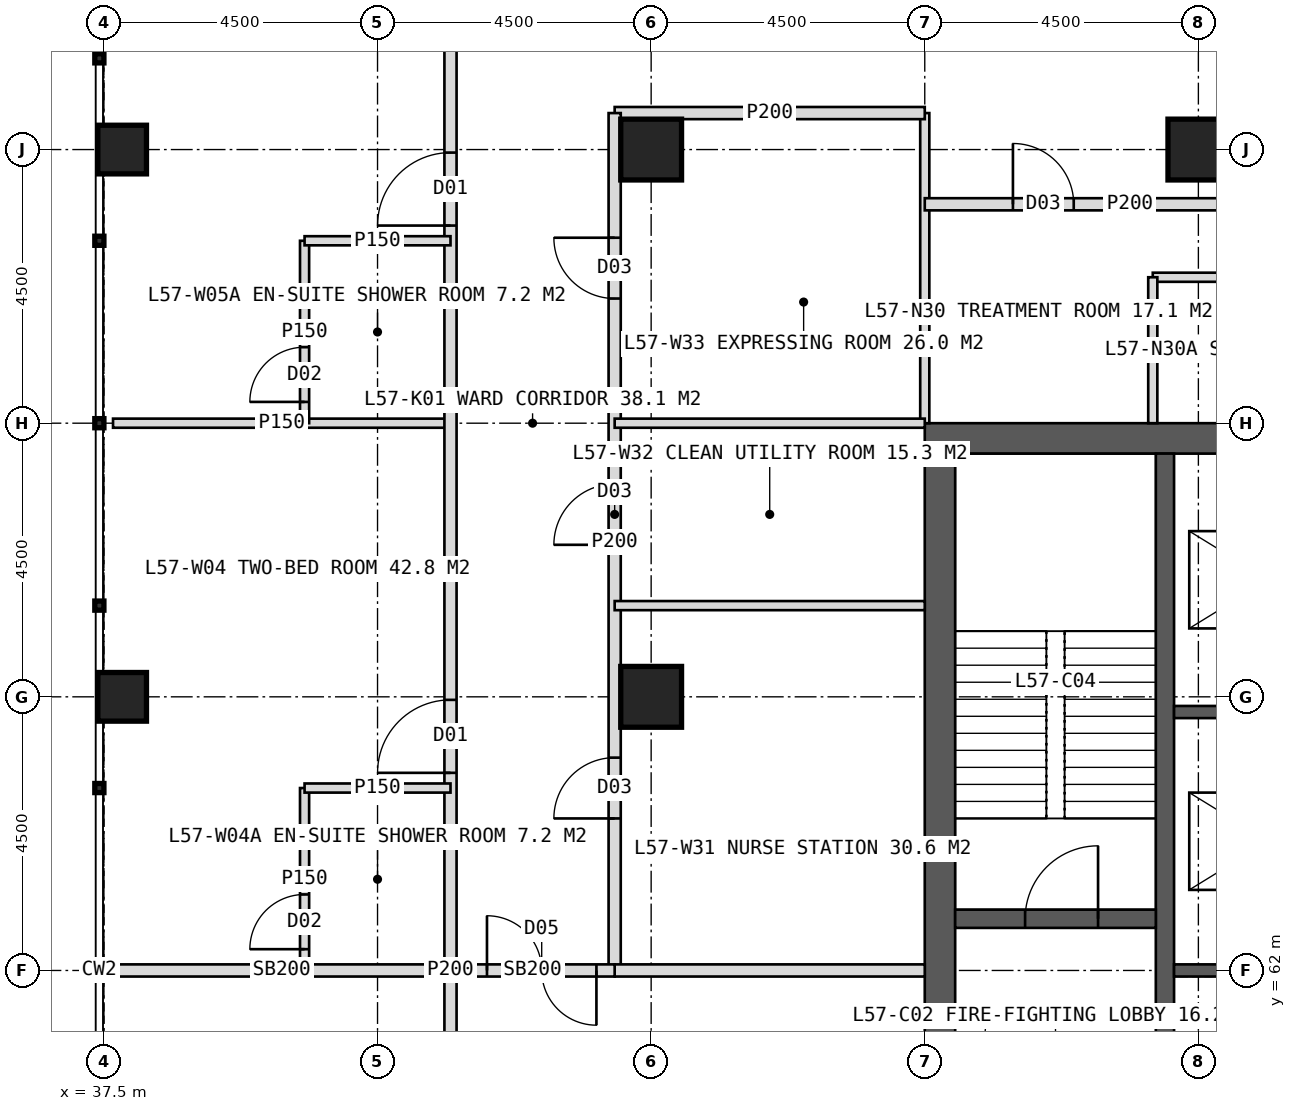
"""IFC4 building model, lengths in metres.
Left out: names, types, materials, properties, quantities, classifications, styles, units other than length and angle.
Written with IfcOpenShell. Run it as: python <this file> out.ifc"""

import sys

from ifc_helpers import new_model, si_unit, direction, frame, frame_2d, origin, origin_2d, place, context, subcontext, project, spatial, rectangle, hollow_rectangle, extrude, element, fill, save


model = new_model("IFC4")
c1 = context("Model", 3, precision=1e-05, world=origin(), true_north=direction((0.0, 1.0)))
c2 = subcontext(c1, "Body", "Model", "MODEL_VIEW")
j1 = project(units=[si_unit("LENGTHUNIT", "METRE"), si_unit("PLANEANGLEUNIT", "RADIAN")], contexts=[c1])
p1 = place(None, origin())
s1 = spatial("IfcSite", under=j1, at=p1, CompositionType="ELEMENT")
p2 = place(p1, origin())
s2 = spatial("IfcBuilding", under=s1, at=p2, CompositionType="ELEMENT")
p3 = place(p2, frame((0.0, 0.0, 237.0)))
s3 = spatial("IfcBuildingStorey", under=s2, at=p3, CompositionType="ELEMENT", Elevation=237.0)
p4 = place(p3, frame((51.0, 70.75, 0.0), z_axis=(0.0, 0.0, 1.0), x_axis=(1.0, 0.0, 0.0)))
e1 = element("IfcWall", 1, at=p4, inside=s3, PredefinedType="SHEAR", context=c2, shape_type="SweptSolid", body=[
    extrude(rectangle(XDim=18.0, YDim=0.5, at=frame_2d((9.0, 0.0))), origin(), (0.0, 0.0, 1.0), 4.0),
])
p5 = place(p4, frame((8.1, 0.0, 0.0)))
e2 = element("IfcOpeningElement", 2, at=p5, cuts=e1, PredefinedType="OPENING", context=c2, shape_type="SweptSolid", body=[
    extrude(rectangle(XDim=1.8, YDim=2.2, at=frame_2d((0.9, 1.1))), frame((0.0, 0.26, 0.0), z_axis=(0.0, -1.0, 0.0), x_axis=(1.0, 0.0, 0.0)), (0.0, 0.0, 1.0), 0.52),
])
p6 = place(p3, frame((51.25, 53.5, 0.0), z_axis=(0.0, 0.0, 1.0), x_axis=(0.0, 1.0, 0.0)))
e3 = element("IfcWall", 3, at=p6, inside=s3, PredefinedType="SHEAR", context=c2, shape_type="SweptSolid", body=[
    extrude(rectangle(XDim=17.0, YDim=0.5, at=frame_2d((8.5, 0.0))), origin(), (0.0, 0.0, 1.0), 4.0),
])
p7 = place(p6, frame((6.1, 0.0, 0.0)))
e4 = element("IfcOpeningElement", 4, at=p7, cuts=e3, PredefinedType="OPENING", context=c2, shape_type="SweptSolid", body=[
    extrude(rectangle(XDim=1.5, YDim=2.2, at=frame_2d((0.75, 1.1))), frame((0.0, 0.26, 0.0), z_axis=(0.0, -1.0, 0.0), x_axis=(1.0, 0.0, 0.0)), (0.0, 0.0, 1.0), 0.52),
])
p8 = place(p3, frame((54.95, 53.5, 0.0), z_axis=(0.0, 0.0, 1.0), x_axis=(0.0, 1.0, 0.0)))
e5 = element("IfcWall", 5, at=p8, inside=s3, PredefinedType="SHEAR", context=c2, shape_type="SweptSolid", body=[
    extrude(rectangle(XDim=17.0, YDim=0.3, at=frame_2d((8.5, 0.0))), origin(), (0.0, 0.0, 1.0), 4.0),
])
for number, where, z_axis, x_axis in (
    (6, (55.1, 62.0, 0.0), (0.0, 0.0, 1.0), (1.0, 0.0, 0.0)),
    (7, (55.1, 66.25, 0.0), (0.0, 0.0, 1.0), (1.0, 0.0, 0.0)),
):
    element("IfcWall", number, at=place(p3, frame(where, z_axis=z_axis, x_axis=x_axis)), inside=s3, PredefinedType="SHEAR", context=c2, shape_type="SweptSolid", body=[
        extrude(rectangle(XDim=3.05, YDim=0.2, at=frame_2d((1.525, 0.0))), origin(), (0.0, 0.0, 1.0), 4.0),
    ])
p9 = place(p3, frame((51.5, 62.85, 0.0), z_axis=(0.0, 0.0, 1.0), x_axis=(1.0, 0.0, 0.0)))
e8 = element("IfcWall", 8, at=p9, inside=s3, PredefinedType="SHEAR", context=c2, shape_type="SweptSolid", body=[
    extrude(rectangle(XDim=3.3, YDim=0.3, at=frame_2d((1.65, 0.0))), origin(), (0.0, 0.0, 1.0), 4.0),
])
p10 = place(p9, frame((1.15, 0.0, 0.0)))
e9 = element("IfcOpeningElement", 9, at=p10, cuts=e8, PredefinedType="OPENING", context=c2, shape_type="SweptSolid", body=[
    extrude(rectangle(XDim=1.2, YDim=2.1, at=frame_2d((0.6, 1.05))), frame((0.0, 0.16, 0.0), z_axis=(0.0, -1.0, 0.0), x_axis=(1.0, 0.0, 0.0)), (0.0, 0.0, 1.0), 0.32),
])
for number, where, z_axis, x_axis in (
    (10, (46.5, 75.5, 0.0), (0.0, 0.0, 1.0), (1.0, 0.0, 0.0)),
    (11, (55.5, 75.5, 0.0), (0.0, 0.0, 1.0), (1.0, 0.0, 0.0)),
    (12, (46.5, 66.5, 0.0), (0.0, 0.0, 1.0), (1.0, 0.0, 0.0)),
):
    element("IfcColumn", number, at=place(p3, frame(where, z_axis=z_axis, x_axis=x_axis)), inside=s3, PredefinedType="COLUMN", context=c2, shape_type="SweptSolid", body=[
        extrude(hollow_rectangle(XDim=1.0, YDim=1.0, WallThickness=0.1, at=origin_2d()), origin(), (0.0, 0.0, 1.0), 4.0),
    ])
for number, where, z_axis, x_axis in (
    (13, (37.8, 66.5, 0.0), (0.0, 0.0, 1.0), (1.0, 0.0, 0.0)),
    (14, (37.8, 75.5, 0.0), (0.0, 0.0, 1.0), (1.0, 0.0, 0.0)),
):
    element("IfcColumn", number, at=place(p3, frame(where, z_axis=z_axis, x_axis=x_axis)), inside=s3, PredefinedType="COLUMN", context=c2, shape_type="SweptSolid", body=[
        extrude(hollow_rectangle(XDim=0.8, YDim=0.8, WallThickness=0.08, at=origin_2d()), origin(), (0.0, 0.0, 1.0), 4.0),
    ])
p11 = place(p3, frame((51.0, 71.0, 0.0), z_axis=(0.0, 0.0, 1.0), x_axis=(0.0, 1.0, 0.0)))
e15 = element("IfcWall", 15, at=p11, inside=s3, PredefinedType="PARTITIONING", context=c2, shape_type="SweptSolid", body=[
    extrude(rectangle(XDim=5.1, YDim=0.15, at=frame_2d((2.55, 0.0))), origin(), (0.0, 0.0, 1.0), 3.75),
])
p12 = place(p3, frame((45.9, 76.1, 0.0), z_axis=(0.0, 0.0, 1.0), x_axis=(1.0, 0.0, 0.0)))
e16 = element("IfcWall", 16, at=p12, inside=s3, PredefinedType="PARTITIONING", context=c2, shape_type="SweptSolid", body=[
    extrude(rectangle(XDim=5.1, YDim=0.2, at=frame_2d((2.55, 0.0))), origin(), (0.0, 0.0, 1.0), 3.75),
])
p13 = place(p3, frame((51.0, 74.6, 0.0), z_axis=(0.0, 0.0, 1.0), x_axis=(1.0, 0.0, 0.0)))
e17 = element("IfcWall", 17, at=p13, inside=s3, PredefinedType="PARTITIONING", context=c2, shape_type="SweptSolid", body=[
    extrude(rectangle(XDim=6.75, YDim=0.2, at=frame_2d((3.375, 0.0))), origin(), (0.0, 0.0, 1.0), 3.75),
])
p14 = place(p13, frame((1.45, 0.0, 0.0)))
e18 = element("IfcOpeningElement", 18, at=p14, cuts=e17, PredefinedType="OPENING", context=c2, shape_type="SweptSolid", body=[
    extrude(rectangle(XDim=1.0, YDim=2.1, at=frame_2d((0.5, 1.05))), frame((0.0, 0.11, 0.0), z_axis=(0.0, -1.0, 0.0), x_axis=(1.0, 0.0, 0.0)), (0.0, 0.0, 1.0), 0.22),
])
p15 = place(p3, frame((54.75, 73.4, 0.0), z_axis=(0.0, 0.0, 1.0), x_axis=(1.0, 0.0, 0.0)))
e19 = element("IfcWall", 19, at=p15, inside=s3, PredefinedType="PARTITIONING", context=c2, shape_type="SweptSolid", body=[
    extrude(rectangle(XDim=3.0, YDim=0.15, at=frame_2d((1.5, 0.0))), origin(), (0.0, 0.0, 1.0), 3.75),
])
p16 = place(p3, frame((54.75, 71.0, 0.0), z_axis=(0.0, 0.0, 1.0), x_axis=(0.0, 1.0, 0.0)))
e20 = element("IfcWall", 20, at=p16, inside=s3, PredefinedType="PARTITIONING", context=c2, shape_type="SweptSolid", body=[
    extrude(rectangle(XDim=2.4, YDim=0.15, at=frame_2d((1.2, 0.0))), origin(), (0.0, 0.0, 1.0), 3.75),
])
p17 = place(p3, frame((43.2, 62.0, 0.0), z_axis=(0.0, 0.0, 1.0), x_axis=(-1.0, 0.0, 0.0)))
e21 = element("IfcWall", 21, at=p17, inside=s3, PredefinedType="SOLIDWALL", context=c2, shape_type="SweptSolid", body=[
    extrude(rectangle(XDim=5.55, YDim=0.2, at=frame_2d((2.775, 0.0))), origin(), (0.0, 0.0, 1.0), 2.95),
])
p18 = place(p3, frame((43.2, 71.0, 0.0), z_axis=(0.0, 0.0, 1.0), x_axis=(-1.0, 0.0, 0.0)))
e22 = element("IfcWall", 22, at=p18, inside=s3, PredefinedType="PARTITIONING", context=c2, shape_type="SweptSolid", body=[
    extrude(rectangle(XDim=5.55, YDim=0.15, at=frame_2d((2.775, 0.0))), origin(), (0.0, 0.0, 1.0), 3.75),
])
p19 = place(p3, frame((43.2, 45.2, 0.0), z_axis=(0.0, 0.0, 1.0), x_axis=(0.0, 1.0, 0.0)))
e23 = element("IfcWall", 23, at=p19, inside=s3, PredefinedType="PARTITIONING", context=c2, shape_type="SweptSolid", body=[
    extrude(rectangle(XDim=33.6, YDim=0.2, at=frame_2d((16.8, 0.0))), origin(), (0.0, 0.0, 1.0), 3.75),
])
p20 = place(p19, frame((2.65, 0.0, 0.0)))
e24 = element("IfcOpeningElement", 24, at=p20, cuts=e23, PredefinedType="OPENING", context=c2, shape_type="SweptSolid", body=[
    extrude(rectangle(XDim=1.2, YDim=2.2, at=frame_2d((0.6, 1.1))), frame((0.0, 0.11, 0.0), z_axis=(0.0, -1.0, 0.0), x_axis=(1.0, 0.0, 0.0)), (0.0, 0.0, 1.0), 0.22),
])
p21 = place(p19, frame((7.45, 0.0, 0.0)))
e25 = element("IfcOpeningElement", 25, at=p21, cuts=e23, PredefinedType="OPENING", context=c2, shape_type="SweptSolid", body=[
    extrude(rectangle(XDim=1.2, YDim=2.2, at=frame_2d((0.6, 1.1))), frame((0.0, 0.11, 0.0), z_axis=(0.0, -1.0, 0.0), x_axis=(1.0, 0.0, 0.0)), (0.0, 0.0, 1.0), 0.22),
])
p22 = place(p19, frame((13.45, 0.0, 0.0)))
e26 = element("IfcOpeningElement", 26, at=p22, cuts=e23, PredefinedType="OPENING", context=c2, shape_type="SweptSolid", body=[
    extrude(rectangle(XDim=1.2, YDim=2.2, at=frame_2d((0.6, 1.1))), frame((0.0, 0.11, 0.0), z_axis=(0.0, -1.0, 0.0), x_axis=(1.0, 0.0, 0.0)), (0.0, 0.0, 1.0), 0.22),
])
p23 = place(p19, frame((20.05, 0.0, 0.0)))
e27 = element("IfcOpeningElement", 27, at=p23, cuts=e23, PredefinedType="OPENING", context=c2, shape_type="SweptSolid", body=[
    extrude(rectangle(XDim=1.2, YDim=2.2, at=frame_2d((0.6, 1.1))), frame((0.0, 0.11, 0.0), z_axis=(0.0, -1.0, 0.0), x_axis=(1.0, 0.0, 0.0)), (0.0, 0.0, 1.0), 0.22),
])
p24 = place(p19, frame((29.05, 0.0, 0.0)))
e28 = element("IfcOpeningElement", 28, at=p24, cuts=e23, PredefinedType="OPENING", context=c2, shape_type="SweptSolid", body=[
    extrude(rectangle(XDim=1.2, YDim=2.2, at=frame_2d((0.6, 1.1))), frame((0.0, 0.11, 0.0), z_axis=(0.0, -1.0, 0.0), x_axis=(1.0, 0.0, 0.0)), (0.0, 0.0, 1.0), 0.22),
])
p25 = place(p3, frame((40.8, 62.0, 0.0), z_axis=(0.0, 0.0, 1.0), x_axis=(0.0, 1.0, 0.0)))
e29 = element("IfcWall", 29, at=p25, inside=s3, PredefinedType="PARTITIONING", context=c2, shape_type="SweptSolid", body=[
    extrude(rectangle(XDim=3.0, YDim=0.15, at=frame_2d((1.5, 0.0))), origin(), (0.0, 0.0, 1.0), 3.75),
])
p26 = place(p25, frame((0.35, 0.0, 0.0)))
e30 = element("IfcOpeningElement", 30, at=p26, cuts=e29, PredefinedType="OPENING", context=c2, shape_type="SweptSolid", body=[
    extrude(rectangle(XDim=0.9, YDim=2.1, at=frame_2d((0.45, 1.05))), frame((0.0, 0.085, 0.0), z_axis=(0.0, -1.0, 0.0), x_axis=(1.0, 0.0, 0.0)), (0.0, 0.0, 1.0), 0.17),
])
p27 = place(p3, frame((43.2, 65.0, 0.0), z_axis=(0.0, 0.0, 1.0), x_axis=(-1.0, 0.0, 0.0)))
e31 = element("IfcWall", 31, at=p27, inside=s3, PredefinedType="PARTITIONING", context=c2, shape_type="SweptSolid", body=[
    extrude(rectangle(XDim=2.4, YDim=0.15, at=frame_2d((1.2, 0.0))), origin(), (0.0, 0.0, 1.0), 3.75),
])
p28 = place(p3, frame((40.8, 71.0, 0.0), z_axis=(0.0, 0.0, 1.0), x_axis=(0.0, 1.0, 0.0)))
e32 = element("IfcWall", 32, at=p28, inside=s3, PredefinedType="PARTITIONING", context=c2, shape_type="SweptSolid", body=[
    extrude(rectangle(XDim=3.0, YDim=0.15, at=frame_2d((1.5, 0.0))), origin(), (0.0, 0.0, 1.0), 3.75),
])
p29 = place(p28, frame((0.35, 0.0, 0.0)))
e33 = element("IfcOpeningElement", 33, at=p29, cuts=e32, PredefinedType="OPENING", context=c2, shape_type="SweptSolid", body=[
    extrude(rectangle(XDim=0.9, YDim=2.1, at=frame_2d((0.45, 1.05))), frame((0.0, 0.085, 0.0), z_axis=(0.0, -1.0, 0.0), x_axis=(1.0, 0.0, 0.0)), (0.0, 0.0, 1.0), 0.17),
])
p30 = place(p3, frame((43.2, 74.0, 0.0), z_axis=(0.0, 0.0, 1.0), x_axis=(-1.0, 0.0, 0.0)))
e34 = element("IfcWall", 34, at=p30, inside=s3, PredefinedType="PARTITIONING", context=c2, shape_type="SweptSolid", body=[
    extrude(rectangle(XDim=2.4, YDim=0.15, at=frame_2d((1.2, 0.0))), origin(), (0.0, 0.0, 1.0), 3.75),
])
p31 = place(p3, frame((45.9, 62.0, 0.0), z_axis=(0.0, 0.0, 1.0), x_axis=(0.0, 1.0, 0.0)))
e35 = element("IfcWall", 35, at=p31, inside=s3, PredefinedType="PARTITIONING", context=c2, shape_type="SweptSolid", body=[
    extrude(rectangle(XDim=14.1, YDim=0.2, at=frame_2d((7.05, 0.0))), origin(), (0.0, 0.0, 1.0), 3.75),
])
p32 = place(p31, frame((2.5, 0.0, 0.0)))
e36 = element("IfcOpeningElement", 36, at=p32, cuts=e35, PredefinedType="OPENING", context=c2, shape_type="SweptSolid", body=[
    extrude(rectangle(XDim=1.0, YDim=2.1, at=frame_2d((0.5, 1.05))), frame((0.0, 0.11, 0.0), z_axis=(0.0, -1.0, 0.0), x_axis=(1.0, 0.0, 0.0)), (0.0, 0.0, 1.0), 0.22),
])
p33 = place(p31, frame((7.0, 0.0, 0.0)))
e37 = element("IfcOpeningElement", 37, at=p33, cuts=e35, PredefinedType="OPENING", context=c2, shape_type="SweptSolid", body=[
    extrude(rectangle(XDim=1.0, YDim=2.1, at=frame_2d((0.5, 1.05))), frame((0.0, 0.11, 0.0), z_axis=(0.0, -1.0, 0.0), x_axis=(1.0, 0.0, 0.0)), (0.0, 0.0, 1.0), 0.22),
])
p34 = place(p31, frame((11.05, 0.0, 0.0)))
e38 = element("IfcOpeningElement", 38, at=p34, cuts=e35, PredefinedType="OPENING", context=c2, shape_type="SweptSolid", body=[
    extrude(rectangle(XDim=1.0, YDim=2.1, at=frame_2d((0.5, 1.05))), frame((0.0, 0.11, 0.0), z_axis=(0.0, -1.0, 0.0), x_axis=(1.0, 0.0, 0.0)), (0.0, 0.0, 1.0), 0.22),
])
p35 = place(p3, frame((51.0, 62.0, 0.0), z_axis=(0.0, 0.0, 1.0), x_axis=(-1.0, 0.0, 0.0)))
e39 = element("IfcWall", 39, at=p35, inside=s3, PredefinedType="SOLIDWALL", context=c2, shape_type="SweptSolid", body=[
    extrude(rectangle(XDim=5.1, YDim=0.2, at=frame_2d((2.55, 0.0))), origin(), (0.0, 0.0, 1.0), 2.95),
])
for number, where, z_axis, x_axis in (
    (40, (51.0, 68.0, 0.0), (0.0, 0.0, 1.0), (-1.0, 0.0, 0.0)),
    (41, (51.0, 71.0, 0.0), (0.0, 0.0, 1.0), (-1.0, 0.0, 0.0)),
):
    element("IfcWall", number, at=place(p3, frame(where, z_axis=z_axis, x_axis=x_axis)), inside=s3, PredefinedType="PARTITIONING", context=c2, shape_type="SweptSolid", body=[
        extrude(rectangle(XDim=5.1, YDim=0.15, at=frame_2d((2.55, 0.0))), origin(), (0.0, 0.0, 1.0), 3.75),
    ])
p36 = place(p3, frame((45.9, 62.0, 0.0), z_axis=(0.0, 0.0, 1.0), x_axis=(-1.0, 0.0, 0.0)))
e42 = element("IfcWall", 42, at=p36, inside=s3, PredefinedType="SOLIDWALL", context=c2, shape_type="SweptSolid", body=[
    extrude(rectangle(XDim=2.7, YDim=0.2, at=frame_2d((1.35, 0.0))), origin(), (0.0, 0.0, 1.0), 2.95),
])
p37 = place(p36, frame((0.3, 0.0, 0.0)))
e43 = element("IfcOpeningElement", 43, at=p37, cuts=e42, PredefinedType="OPENING", context=c2, shape_type="SweptSolid", body=[
    extrude(rectangle(XDim=1.8, YDim=2.2, at=frame_2d((0.9, 1.1))), frame((0.0, 0.11, 0.0), z_axis=(0.0, -1.0, 0.0), x_axis=(1.0, 0.0, 0.0)), (0.0, 0.0, 1.0), 0.22),
])
p38 = place(p14, origin())
e44 = element("IfcDoor", 44, at=p38, inside=s3, OperationType="SINGLE_SWING_LEFT", PredefinedType="DOOR", context=c2, shape_type="SweptSolid", body=[
    extrude(rectangle(XDim=1.0, YDim=2.1, at=frame_2d((0.5, 1.05))), frame((0.0, 0.025, 0.0), z_axis=(0.0, -1.0, 0.0), x_axis=(1.0, 0.0, 0.0)), (0.0, 0.0, 1.0), 0.05),
])
fill(e18, e44)
p39 = place(p23, origin())
e45 = element("IfcDoor", 45, at=p39, inside=s3, OperationType="SINGLE_SWING_LEFT", PredefinedType="DOOR", context=c2, shape_type="SweptSolid", body=[
    extrude(rectangle(XDim=1.2, YDim=2.2, at=frame_2d((0.6, 1.1))), frame((0.0, 0.025, 0.0), z_axis=(0.0, -1.0, 0.0), x_axis=(1.0, 0.0, 0.0)), (0.0, 0.0, 1.0), 0.05),
])
fill(e27, e45)
p40 = place(p26, origin())
e46 = element("IfcDoor", 46, at=p40, inside=s3, OperationType="SINGLE_SWING_LEFT", PredefinedType="DOOR", context=c2, shape_type="SweptSolid", body=[
    extrude(rectangle(XDim=0.9, YDim=2.1, at=frame_2d((0.45, 1.05))), frame((0.0, 0.025, 0.0), z_axis=(0.0, -1.0, 0.0), x_axis=(1.0, 0.0, 0.0)), (0.0, 0.0, 1.0), 0.05),
])
fill(e30, e46)
p41 = place(p24, origin())
e47 = element("IfcDoor", 47, at=p41, inside=s3, OperationType="SINGLE_SWING_LEFT", PredefinedType="DOOR", context=c2, shape_type="SweptSolid", body=[
    extrude(rectangle(XDim=1.2, YDim=2.2, at=frame_2d((0.6, 1.1))), frame((0.0, 0.025, 0.0), z_axis=(0.0, -1.0, 0.0), x_axis=(1.0, 0.0, 0.0)), (0.0, 0.0, 1.0), 0.05),
])
fill(e28, e47)
p42 = place(p29, origin())
e48 = element("IfcDoor", 48, at=p42, inside=s3, OperationType="SINGLE_SWING_LEFT", PredefinedType="DOOR", context=c2, shape_type="SweptSolid", body=[
    extrude(rectangle(XDim=0.9, YDim=2.1, at=frame_2d((0.45, 1.05))), frame((0.0, 0.025, 0.0), z_axis=(0.0, -1.0, 0.0), x_axis=(1.0, 0.0, 0.0)), (0.0, 0.0, 1.0), 0.05),
])
fill(e33, e48)
p43 = place(p32, origin())
e49 = element("IfcDoor", 49, at=p43, inside=s3, OperationType="SINGLE_SWING_LEFT", PredefinedType="DOOR", context=c2, shape_type="SweptSolid", body=[
    extrude(rectangle(XDim=1.0, YDim=2.1, at=frame_2d((0.5, 1.05))), frame((0.0, 0.025, 0.0), z_axis=(0.0, -1.0, 0.0), x_axis=(1.0, 0.0, 0.0)), (0.0, 0.0, 1.0), 0.05),
])
fill(e36, e49)
p44 = place(p33, origin())
e50 = element("IfcDoor", 50, at=p44, inside=s3, OperationType="SINGLE_SWING_LEFT", PredefinedType="DOOR", context=c2, shape_type="SweptSolid", body=[
    extrude(rectangle(XDim=1.0, YDim=2.1, at=frame_2d((0.5, 1.05))), frame((0.0, 0.025, 0.0), z_axis=(0.0, -1.0, 0.0), x_axis=(1.0, 0.0, 0.0)), (0.0, 0.0, 1.0), 0.05),
])
fill(e37, e50)
p45 = place(p34, origin())
e51 = element("IfcDoor", 51, at=p45, inside=s3, OperationType="SINGLE_SWING_RIGHT", PredefinedType="DOOR", context=c2, shape_type="SweptSolid", body=[
    extrude(rectangle(XDim=1.0, YDim=2.1, at=frame_2d((0.5, 1.05))), frame((0.0, 0.025, 0.0), z_axis=(0.0, -1.0, 0.0), x_axis=(1.0, 0.0, 0.0)), (0.0, 0.0, 1.0), 0.05),
])
fill(e38, e51)
p46 = place(p37, origin())
e52 = element("IfcDoor", 52, at=p46, inside=s3, OperationType="DOUBLE_DOOR_DOUBLE_SWING", PredefinedType="DOOR", context=c2, shape_type="SweptSolid", body=[
    extrude(rectangle(XDim=1.8, YDim=2.2, at=frame_2d((0.9, 1.1))), frame((0.0, 0.025, 0.0), z_axis=(0.0, -1.0, 0.0), x_axis=(1.0, 0.0, 0.0)), (0.0, 0.0, 1.0), 0.05),
])
fill(e43, e52)
p47 = place(p7, origin())
e53 = element("IfcDoor", 53, at=p47, inside=s3, OperationType="DOUBLE_DOOR_SINGLE_SWING", PredefinedType="DOOR", context=c2, shape_type="SweptSolid", body=[
    extrude(rectangle(XDim=1.5, YDim=2.2, at=frame_2d((0.75, 1.1))), frame((0.0, 0.025, 0.0), z_axis=(0.0, -1.0, 0.0), x_axis=(1.0, 0.0, 0.0)), (0.0, 0.0, 1.0), 0.05),
])
fill(e4, e53)
p48 = place(p10, origin())
e54 = element("IfcDoor", 54, at=p48, inside=s3, OperationType="SINGLE_SWING_RIGHT", PredefinedType="DOOR", context=c2, shape_type="SweptSolid", body=[
    extrude(rectangle(XDim=1.2, YDim=2.1, at=frame_2d((0.6, 1.05))), frame((0.0, 0.025, 0.0), z_axis=(0.0, -1.0, 0.0), x_axis=(1.0, 0.0, 0.0)), (0.0, 0.0, 1.0), 0.05),
])
fill(e9, e54)
save(model, sys.argv[1])
